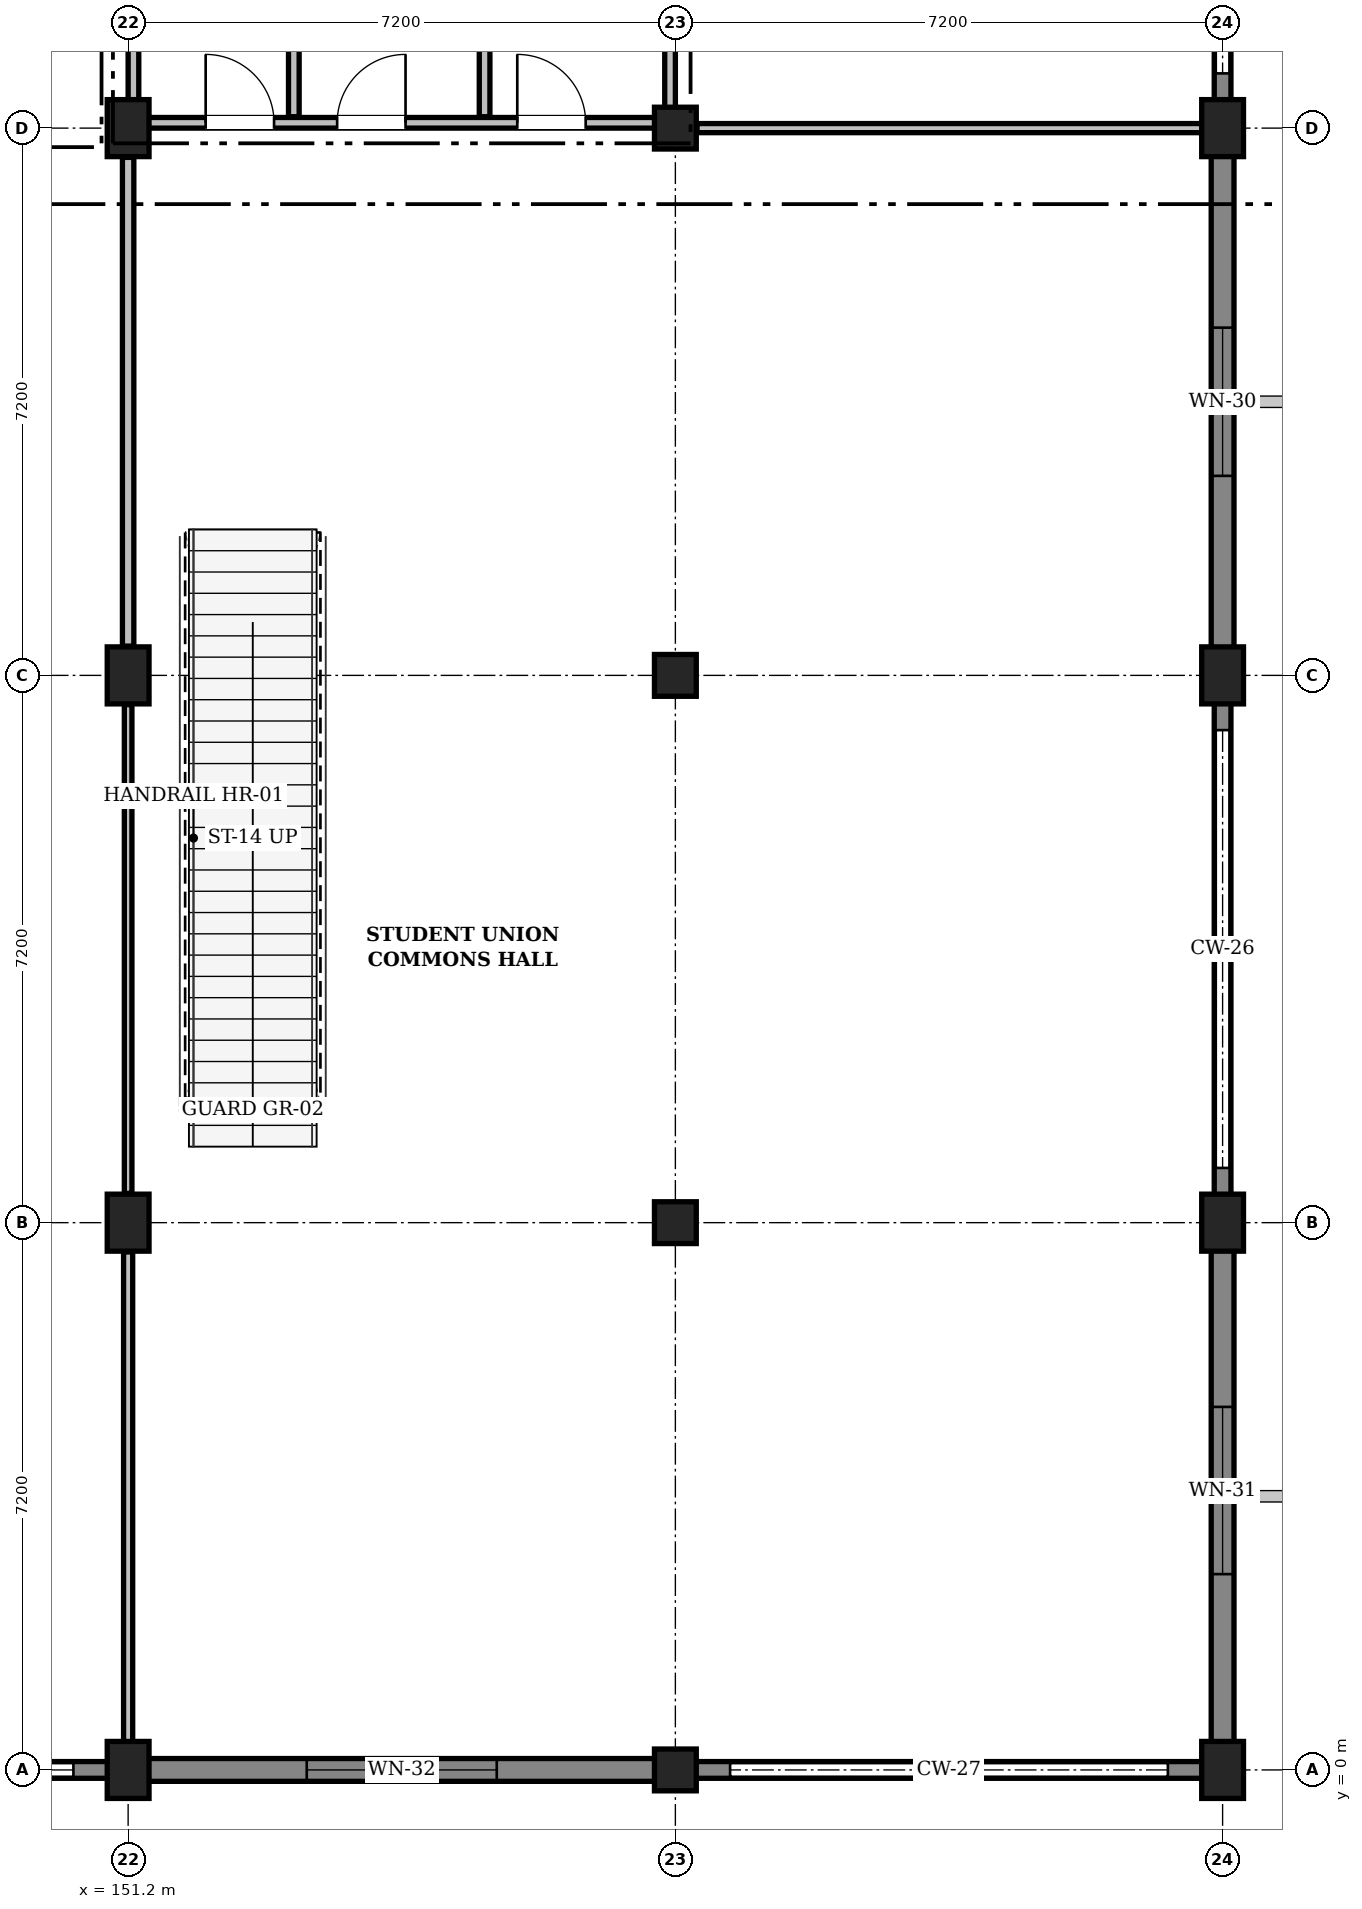
"""IFC4 building model, lengths in metres.
Left out: names, types, materials, properties, quantities, classifications, styles, units other than length and angle.
Written with IfcOpenShell. Run it as: python <this file> out.ifc"""

import sys

from ifc_helpers import new_model, si_unit, direction, frame, frame_2d, origin, origin_2d, place, context, subcontext, project, spatial, rectangle, extrude, element, fill, save


model = new_model("IFC4")
c1 = context("Model", 3, precision=1e-05, world=origin(), true_north=direction((0.0, 1.0)))
c2 = subcontext(c1, "Body", "Model", "MODEL_VIEW")
j1 = project(units=[si_unit("LENGTHUNIT", "METRE"), si_unit("PLANEANGLEUNIT", "RADIAN")], contexts=[c1])
p1 = place(None, origin())
s1 = spatial("IfcSite", under=j1, at=p1, CompositionType="ELEMENT")
p2 = place(p1, origin())
s2 = spatial("IfcBuilding", under=s1, at=p2, CompositionType="ELEMENT")
p3 = place(p2, frame((0.0, 0.0, 4.8)))
s3 = spatial("IfcBuildingStorey", under=s2, at=p3, CompositionType="ELEMENT", Elevation=4.8)
for number, where, z_axis, x_axis in (
    (1, (151.2, 0.0, 0.0), (0.0, 0.0, 1.0), (1.0, 0.0, 0.0)),
    (2, (151.2, 7.2, 0.0), (0.0, 0.0, 1.0), (1.0, 0.0, 0.0)),
    (3, (151.2, 14.4, 0.0), (0.0, 0.0, 1.0), (1.0, 0.0, 0.0)),
    (4, (151.2, 21.6, 0.0), (0.0, 0.0, 1.0), (1.0, 0.0, 0.0)),
):
    element("IfcColumn", number, at=place(p3, frame(where, z_axis=z_axis, x_axis=x_axis)), inside=s3, PredefinedType="COLUMN", context=c2, shape_type="SweptSolid", body=[
        extrude(rectangle(XDim=0.55, YDim=0.75, at=origin_2d()), origin(), (0.0, 0.0, 1.0), 4.8),
    ])
for number, where, z_axis, x_axis in (
    (5, (158.4, 0.0, 0.0), (0.0, 0.0, 1.0), (1.0, 0.0, 0.0)),
    (6, (158.4, 7.2, 0.0), (0.0, 0.0, 1.0), (1.0, 0.0, 0.0)),
    (7, (158.4, 14.4, 0.0), (0.0, 0.0, 1.0), (1.0, 0.0, 0.0)),
    (8, (158.4, 21.6, 0.0), (0.0, 0.0, 1.0), (1.0, 0.0, 0.0)),
):
    element("IfcColumn", number, at=place(p3, frame(where, z_axis=z_axis, x_axis=x_axis)), inside=s3, PredefinedType="COLUMN", context=c2, shape_type="SweptSolid", body=[
        extrude(rectangle(XDim=0.55, YDim=0.55, at=origin_2d()), origin(), (0.0, 0.0, 1.0), 4.8),
    ])
for number, where, z_axis, x_axis in (
    (9, (165.6, 0.0, 0.0), (0.0, 0.0, 1.0), (1.0, 0.0, 0.0)),
    (10, (165.6, 7.2, 0.0), (0.0, 0.0, 1.0), (1.0, 0.0, 0.0)),
    (11, (165.6, 14.4, 0.0), (0.0, 0.0, 1.0), (1.0, 0.0, 0.0)),
    (12, (165.6, 21.6, 0.0), (0.0, 0.0, 1.0), (1.0, 0.0, 0.0)),
):
    element("IfcColumn", number, at=place(p3, frame(where, z_axis=z_axis, x_axis=x_axis)), inside=s3, PredefinedType="COLUMN", context=c2, shape_type="SweptSolid", body=[
        extrude(rectangle(XDim=0.55, YDim=0.75, at=origin_2d()), origin(), (0.0, 0.0, 1.0), 4.8),
    ])
p4 = place(p3, frame((165.6, 28.8, 0.0), z_axis=(0.0, 0.0, 1.0), x_axis=(0.0, -1.0, 0.0)))
e13 = element("IfcWall", 13, at=p4, inside=s3, PredefinedType="SOLIDWALL", context=c2, shape_type="SweptSolid", body=[
    extrude(rectangle(XDim=7.2, YDim=0.22, at=frame_2d((3.6, 0.0))), origin(), (0.0, 0.0, 1.0), 1.24),
])
p5 = place(p3, frame((165.6, 21.6, 0.0), z_axis=(0.0, 0.0, 1.0), x_axis=(0.0, -1.0, 0.0)))
e14 = element("IfcWall", 14, at=p5, inside=s3, PredefinedType="SOLIDWALL", context=c2, shape_type="SweptSolid", body=[
    extrude(rectangle(XDim=7.2, YDim=0.3, at=frame_2d((3.6, 0.0))), origin(), (0.0, 0.0, 1.0), 4.52),
])
p6 = place(p5, frame((2.625, 0.0, 0.95)))
e15 = element("IfcOpeningElement", 15, at=p6, cuts=e14, PredefinedType="OPENING", context=c2, shape_type="SweptSolid", body=[
    extrude(rectangle(XDim=1.95, YDim=1.8, at=frame_2d((0.975, 0.9))), frame((0.0, 0.162, 0.0), z_axis=(0.0, -1.0, 0.0), x_axis=(1.0, 0.0, 0.0)), (0.0, 0.0, 1.0), 0.324),
])
p7 = place(p3, frame((165.6, 14.4, 0.0), z_axis=(0.0, 0.0, 1.0), x_axis=(0.0, -1.0, 0.0)))
e16 = element("IfcWall", 16, at=p7, inside=s3, PredefinedType="SOLIDWALL", context=c2, shape_type="SweptSolid", body=[
    extrude(rectangle(XDim=7.2, YDim=0.22, at=frame_2d((3.6, 0.0))), origin(), (0.0, 0.0, 1.0), 1.24),
])
p8 = place(p3, frame((165.6, 7.2, 0.0), z_axis=(0.0, 0.0, 1.0), x_axis=(0.0, -1.0, 0.0)))
e17 = element("IfcWall", 17, at=p8, inside=s3, PredefinedType="SOLIDWALL", context=c2, shape_type="SweptSolid", body=[
    extrude(rectangle(XDim=7.048, YDim=0.3, at=frame_2d((3.524, 0.0))), origin(), (0.0, 0.0, 1.0), 4.52),
])
p9 = place(p8, frame((2.424, 0.0, 0.95)))
e18 = element("IfcOpeningElement", 18, at=p9, cuts=e17, PredefinedType="OPENING", context=c2, shape_type="SweptSolid", body=[
    extrude(rectangle(XDim=2.2, YDim=1.8, at=frame_2d((1.1, 0.9))), frame((0.0, 0.162, 0.0), z_axis=(0.0, -1.0, 0.0), x_axis=(1.0, 0.0, 0.0)), (0.0, 0.0, 1.0), 0.324),
])
p10 = place(p3, frame((165.75, 0.0, 0.0), z_axis=(0.0, 0.0, 1.0), x_axis=(-1.0, 0.0, 0.0)))
e19 = element("IfcWall", 19, at=p10, inside=s3, PredefinedType="SOLIDWALL", context=c2, shape_type="SweptSolid", body=[
    extrude(rectangle(XDim=7.35, YDim=0.22, at=frame_2d((3.675, 0.0))), origin(), (0.0, 0.0, 1.0), 1.24),
])
p11 = place(p3, frame((158.4, 0.0, 0.0), z_axis=(0.0, 0.0, 1.0), x_axis=(-1.0, 0.0, 0.0)))
e20 = element("IfcWall", 20, at=p11, inside=s3, PredefinedType="SOLIDWALL", context=c2, shape_type="SweptSolid", body=[
    extrude(rectangle(XDim=7.2, YDim=0.3, at=frame_2d((3.6, 0.0))), origin(), (0.0, 0.0, 1.0), 4.52),
])
p12 = place(p11, frame((2.35, 0.0, 0.95)))
e21 = element("IfcOpeningElement", 21, at=p12, cuts=e20, PredefinedType="OPENING", context=c2, shape_type="SweptSolid", body=[
    extrude(rectangle(XDim=2.5, YDim=1.8, at=frame_2d((1.25, 0.9))), frame((0.0, 0.162, 0.0), z_axis=(0.0, -1.0, 0.0), x_axis=(1.0, 0.0, 0.0)), (0.0, 0.0, 1.0), 0.324),
])
p13 = place(p3, frame((151.2, 0.0, 0.0), z_axis=(0.0, 0.0, 1.0), x_axis=(-1.0, 0.0, 0.0)))
e22 = element("IfcWall", 22, at=p13, inside=s3, PredefinedType="SOLIDWALL", context=c2, shape_type="SweptSolid", body=[
    extrude(rectangle(XDim=7.2, YDim=0.22, at=frame_2d((3.6, 0.0))), origin(), (0.0, 0.0, 1.0), 1.24),
])
p14 = place(p3, frame((151.27, 21.67, 0.0), z_axis=(0.0, 0.0, 1.0), x_axis=(1.0, 0.0, 0.0)))
e23 = element("IfcWall", 23, at=p14, inside=s3, PredefinedType="PARTITIONING", context=c2, shape_type="SweptSolid", body=[
    extrude(rectangle(XDim=7.06, YDim=0.14, at=frame_2d((3.53, 0.0))), origin(), (0.0, 0.0, 1.0), 3.9),
])
p15 = place(p14, frame((0.95, 0.0, 0.0)))
e24 = element("IfcOpeningElement", 24, at=p15, cuts=e23, PredefinedType="OPENING", context=c2, shape_type="SweptSolid", body=[
    extrude(rectangle(XDim=0.9, YDim=2.08, at=frame_2d((0.45, 1.04))), frame((0.0, 0.082, 0.0), z_axis=(0.0, -1.0, 0.0), x_axis=(1.0, 0.0, 0.0)), (0.0, 0.0, 1.0), 0.164),
])
p16 = place(p14, frame((2.68, 0.0, 0.0)))
e25 = element("IfcOpeningElement", 25, at=p16, cuts=e23, PredefinedType="OPENING", context=c2, shape_type="SweptSolid", body=[
    extrude(rectangle(XDim=0.9, YDim=2.08, at=frame_2d((0.45, 1.04))), frame((0.0, 0.082, 0.0), z_axis=(0.0, -1.0, 0.0), x_axis=(1.0, 0.0, 0.0)), (0.0, 0.0, 1.0), 0.164),
])
p17 = place(p14, frame((5.05, 0.0, 0.0)))
e26 = element("IfcOpeningElement", 26, at=p17, cuts=e23, PredefinedType="OPENING", context=c2, shape_type="SweptSolid", body=[
    extrude(rectangle(XDim=0.9, YDim=2.08, at=frame_2d((0.45, 1.04))), frame((0.0, 0.082, 0.0), z_axis=(0.0, -1.0, 0.0), x_axis=(1.0, 0.0, 0.0)), (0.0, 0.0, 1.0), 0.164),
])
for number, where, z_axis, x_axis in (
    (27, (151.27, 21.75, 0.0), (0.0, 0.0, 1.0), (0.0, 1.0, 0.0)),
    (28, (158.33, 21.75, 0.0), (0.0, 0.0, 1.0), (0.0, 1.0, 0.0)),
):
    element("IfcWall", number, at=place(p3, frame(where, z_axis=z_axis, x_axis=x_axis)), inside=s3, PredefinedType="PARTITIONING", context=c2, shape_type="SweptSolid", body=[
        extrude(rectangle(XDim=6.9, YDim=0.14, at=frame_2d((3.45, 0.0))), origin(), (0.0, 0.0, 1.0), 4.08),
    ])
for number, where, z_axis, x_axis in (
    (29, (153.38, 21.75, 0.0), (0.0, 0.0, 1.0), (0.0, 1.0, 0.0)),
    (30, (155.89, 21.75, 0.0), (0.0, 0.0, 1.0), (0.0, 1.0, 0.0)),
):
    element("IfcWall", number, at=place(p3, frame(where, z_axis=z_axis, x_axis=x_axis)), inside=s3, PredefinedType="PARTITIONING", context=c2, shape_type="SweptSolid", body=[
        extrude(rectangle(XDim=6.9, YDim=0.14, at=frame_2d((3.45, 0.0))), origin(), (0.0, 0.0, 1.0), 4.46),
    ])
p18 = place(p3, frame((151.2, 0.162, 0.0), z_axis=(0.0, 0.0, 1.0), x_axis=(0.0, 1.0, 0.0)))
e31 = element("IfcWall", 31, at=p18, inside=s3, PredefinedType="PARTITIONING", context=c2, shape_type="SweptSolid", body=[
    extrude(rectangle(XDim=6.653, YDim=0.12, at=frame_2d((3.326, 0.0))), origin(), (0.0, 0.0, 1.0), 4.08),
])
p19 = place(p3, frame((151.2, 7.585, 0.0), z_axis=(0.0, 0.0, 1.0), x_axis=(0.0, 1.0, 0.0)))
e32 = element("IfcWall", 32, at=p19, inside=s3, PredefinedType="PARTITIONING", context=c2, shape_type="SweptSolid", body=[
    extrude(rectangle(XDim=6.43, YDim=0.1, at=frame_2d((3.215, 0.0))), origin(), (0.0, 0.0, 1.0), 4.08),
])
p20 = place(p3, frame((151.2, 14.785, 0.0), z_axis=(0.0, 0.0, 1.0), x_axis=(0.0, 1.0, 0.0)))
e33 = element("IfcWall", 33, at=p20, inside=s3, PredefinedType="PARTITIONING", context=c2, shape_type="SweptSolid", body=[
    extrude(rectangle(XDim=6.43, YDim=0.15, at=frame_2d((3.215, 0.0))), origin(), (0.0, 0.0, 1.0), 4.08),
])
p21 = place(p3, frame((158.685, 21.6, 0.0), z_axis=(0.0, 0.0, 1.0), x_axis=(1.0, 0.0, 0.0)))
e34 = element("IfcWall", 34, at=p21, inside=s3, PredefinedType="PARTITIONING", context=c2, shape_type="SweptSolid", body=[
    extrude(rectangle(XDim=6.753, YDim=0.12, at=frame_2d((3.376, 0.0))), origin(), (0.0, 0.0, 1.0), 3.9),
])
p22 = place(p6, origin())
e35 = element("IfcWindow", 35, at=p22, inside=s3, PartitioningType="SINGLE_PANEL", PredefinedType="WINDOW", context=c2, shape_type="SweptSolid", body=[
    extrude(rectangle(XDim=1.95, YDim=1.8, at=frame_2d((0.975, 0.9))), frame((0.0, 0.03, 0.0), z_axis=(0.0, -1.0, 0.0), x_axis=(1.0, 0.0, 0.0)), (0.0, 0.0, 1.0), 0.06),
])
fill(e15, e35)
p23 = place(p9, origin())
e36 = element("IfcWindow", 36, at=p23, inside=s3, PartitioningType="SINGLE_PANEL", PredefinedType="WINDOW", context=c2, shape_type="SweptSolid", body=[
    extrude(rectangle(XDim=2.2, YDim=1.8, at=frame_2d((1.1, 0.9))), frame((0.0, 0.03, 0.0), z_axis=(0.0, -1.0, 0.0), x_axis=(1.0, 0.0, 0.0)), (0.0, 0.0, 1.0), 0.06),
])
fill(e18, e36)
p24 = place(p12, origin())
e37 = element("IfcWindow", 37, at=p24, inside=s3, PartitioningType="SINGLE_PANEL", PredefinedType="WINDOW", context=c2, shape_type="SweptSolid", body=[
    extrude(rectangle(XDim=2.5, YDim=1.8, at=frame_2d((1.25, 0.9))), frame((0.0, 0.03, 0.0), z_axis=(0.0, -1.0, 0.0), x_axis=(1.0, 0.0, 0.0)), (0.0, 0.0, 1.0), 0.06),
])
fill(e21, e37)
p25 = place(p15, origin())
e38 = element("IfcDoor", 38, at=p25, inside=s3, OperationType="SINGLE_SWING_LEFT", PredefinedType="DOOR", context=c2, shape_type="SweptSolid", body=[
    extrude(rectangle(XDim=0.9, YDim=2.08, at=frame_2d((0.45, 1.04))), frame((0.0, 0.025, 0.0), z_axis=(0.0, -1.0, 0.0), x_axis=(1.0, 0.0, 0.0)), (0.0, 0.0, 1.0), 0.05),
])
fill(e24, e38)
p26 = place(p16, origin())
e39 = element("IfcDoor", 39, at=p26, inside=s3, OperationType="SINGLE_SWING_RIGHT", PredefinedType="DOOR", context=c2, shape_type="SweptSolid", body=[
    extrude(rectangle(XDim=0.9, YDim=2.08, at=frame_2d((0.45, 1.04))), frame((0.0, 0.025, 0.0), z_axis=(0.0, -1.0, 0.0), x_axis=(1.0, 0.0, 0.0)), (0.0, 0.0, 1.0), 0.05),
])
fill(e25, e39)
p27 = place(p17, origin())
e40 = element("IfcDoor", 40, at=p27, inside=s3, OperationType="SINGLE_SWING_LEFT", PredefinedType="DOOR", context=c2, shape_type="SweptSolid", body=[
    extrude(rectangle(XDim=0.9, YDim=2.08, at=frame_2d((0.45, 1.04))), frame((0.0, 0.025, 0.0), z_axis=(0.0, -1.0, 0.0), x_axis=(1.0, 0.0, 0.0)), (0.0, 0.0, 1.0), 0.05),
])
fill(e26, e40)
save(model, sys.argv[1])
